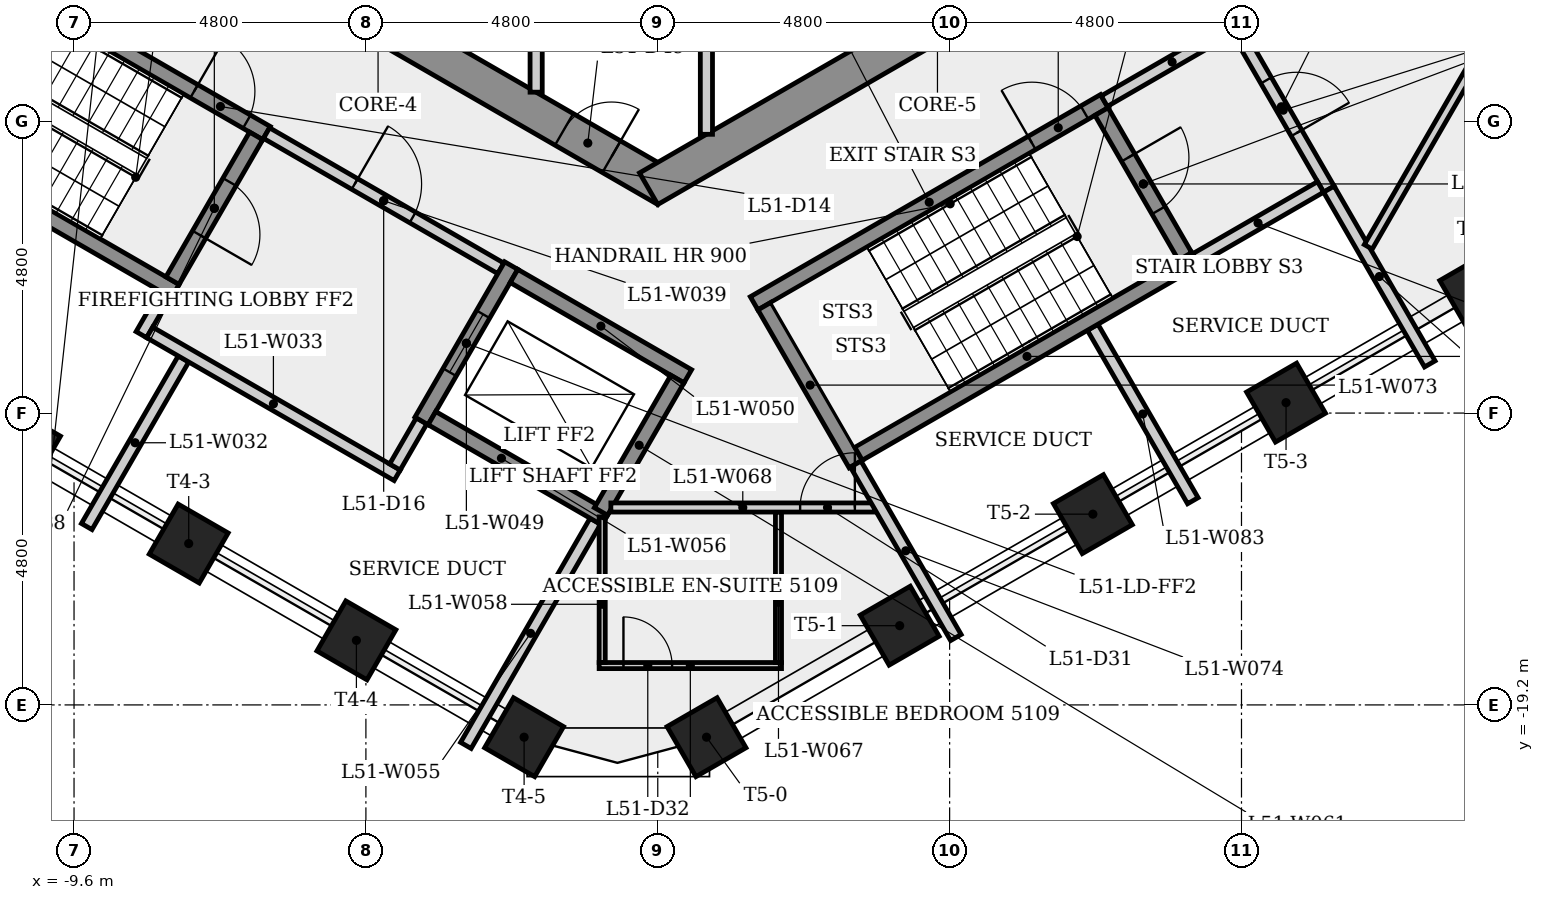
"""IFC4 building model, lengths in metres.
Left out: names, types, materials, properties, quantities, classifications, styles, units other than length and angle.
Written with IfcOpenShell. Run it as: python <this file> out.ifc"""

import sys

from ifc_helpers import new_model, si_unit, direction, frame, frame_2d, origin, origin_2d, place, context, subcontext, project, spatial, rectangle, extrude, element, fill, save


model = new_model("IFC4")
c1 = context("Model", 3, precision=1e-05, world=origin(), true_north=direction((0.0, 1.0)))
c2 = subcontext(c1, "Body", "Model", "MODEL_VIEW")
j1 = project(units=[si_unit("LENGTHUNIT", "METRE"), si_unit("PLANEANGLEUNIT", "RADIAN")], contexts=[c1])
p1 = place(None, origin())
s1 = spatial("IfcSite", under=j1, at=p1, CompositionType="ELEMENT")
p2 = place(p1, origin())
s2 = spatial("IfcBuilding", under=s1, at=p2, CompositionType="ELEMENT")
p3 = place(p2, frame((0.0, 0.0, 190.7)))
s3 = spatial("IfcBuildingStorey", under=s2, at=p3, CompositionType="ELEMENT", Elevation=190.7)
p4 = place(p3, frame((-9.35, -5.225, 0.0), z_axis=(0.0, 0.0, 1.0), x_axis=(0.866023993627, -0.500002442456, 0.0)))
e1 = element("IfcWall", 1, at=p4, inside=s3, PredefinedType="SHEAR", context=c2, shape_type="SweptSolid", body=[
    extrude(rectangle(XDim=10.97, YDim=0.6, at=frame_2d((5.485, 0.0))), origin(), (0.0, 0.0, 1.0), 4.0),
])
p5 = place(p4, frame((3.891, 0.0, 0.0)))
e2 = element("IfcOpeningElement", 2, at=p5, cuts=e1, PredefinedType="OPENING", context=c2, shape_type="SweptSolid", body=[
    extrude(rectangle(XDim=0.9, YDim=2.1, at=frame_2d((0.45, 1.05))), frame((0.0, 0.31, 0.0), z_axis=(0.0, -1.0, 0.0), x_axis=(1.0, 0.0, 0.0)), (0.0, 0.0, 1.0), 0.62),
])
p6 = place(p4, frame((9.018, 0.0, 0.0)))
e3 = element("IfcOpeningElement", 3, at=p6, cuts=e1, PredefinedType="OPENING", context=c2, shape_type="SweptSolid", body=[
    extrude(rectangle(XDim=0.9, YDim=2.1, at=frame_2d((0.45, 1.05))), frame((0.0, 0.31, 0.0), z_axis=(0.0, -1.0, 0.0), x_axis=(1.0, 0.0, 0.0)), (0.0, 0.0, 1.0), 0.62),
])
p7 = place(p3, frame((-0.15, -10.71, 0.0), z_axis=(0.0, 0.0, 1.0), x_axis=(0.866023993627, 0.500002442456, 0.0)))
e4 = element("IfcWall", 4, at=p7, inside=s3, PredefinedType="SHEAR", context=c2, shape_type="SweptSolid", body=[
    extrude(rectangle(XDim=10.97, YDim=0.6, at=frame_2d((5.485, 0.0))), origin(), (0.0, 0.0, 1.0), 4.0),
])
p8 = place(p7, frame((7.166, 0.0, 0.0)))
e5 = element("IfcOpeningElement", 5, at=p8, cuts=e4, PredefinedType="OPENING", context=c2, shape_type="SweptSolid", body=[
    extrude(rectangle(XDim=0.9, YDim=2.1, at=frame_2d((0.45, 1.05))), frame((0.0, 0.31, 0.0), z_axis=(0.0, -1.0, 0.0), x_axis=(1.0, 0.0, 0.0)), (0.0, 0.0, 1.0), 0.62),
])
for number, where, z_axis, x_axis in (
    (6, (-10.472, -14.954, 0.0), (0.0, 0.0, 1.0), (-0.5, -0.866, 0.0)),
    (7, (-7.714, -16.546, 0.0), (0.0, 0.0, 1.0), (-0.5, -0.866, 0.0)),
    (8, (-4.956, -18.138, 0.0), (0.0, 0.0, 1.0), (-0.5, -0.866, 0.0)),
    (9, (-2.198, -19.731, 0.0), (0.0, 0.0, 1.0), (-0.5, -0.866, 0.0)),
    (10, (0.802, -19.731, 0.0), (0.0, 0.0, 1.0), (0.5, -0.866, 0.0)),
    (11, (3.979, -17.897, 0.0), (0.0, 0.0, 1.0), (0.5, -0.866, 0.0)),
    (12, (7.156, -16.062, 0.0), (0.0, 0.0, 1.0), (0.5, -0.866, 0.0)),
    (13, (10.333, -14.228, 0.0), (0.0, 0.0, 1.0), (0.5, -0.866, 0.0)),
    (14, (13.51, -12.394, 0.0), (0.0, 0.0, 1.0), (0.5, -0.866, 0.0)),
):
    element("IfcColumn", number, at=place(p3, frame(where, z_axis=z_axis, x_axis=x_axis)), inside=s3, PredefinedType="COLUMN", context=c2, shape_type="SweptSolid", body=[
        extrude(rectangle(XDim=0.95, YDim=0.95, at=origin_2d()), origin(), (0.0, 0.0, 1.0), 4.0),
    ])
p9 = place(p3, frame((-11.977, -6.595, 0.0), z_axis=(0.0, 0.0, 1.0), x_axis=(0.866025499775, -0.499999833739, 0.0)))
e15 = element("IfcWall", 15, at=p9, inside=s3, PredefinedType="SHEAR", context=c2, shape_type="SweptSolid", body=[
    extrude(rectangle(XDim=6.4, YDim=0.25, at=frame_2d((3.2, 0.0))), origin(), (0.0, 0.0, 1.0), 3.6),
])
p10 = place(p9, frame((5.025, 0.0, 0.0)))
e16 = element("IfcOpeningElement", 16, at=p10, cuts=e15, PredefinedType="OPENING", context=c2, shape_type="SweptSolid", body=[
    extrude(rectangle(XDim=1.0, YDim=2.1, at=frame_2d((0.5, 1.05))), frame((0.0, 0.135, 0.0), z_axis=(0.0, -1.0, 0.0), x_axis=(1.0, 0.0, 0.0)), (0.0, 0.0, 1.0), 0.27),
])
p11 = place(p3, frame((-8.493, -13.11, 0.0), z_axis=(0.0, 0.0, 1.0), x_axis=(0.500067724834, 0.865986299303, 0.0)))
e17 = element("IfcWall", 17, at=p11, inside=s3, PredefinedType="PLUMBINGWALL", context=c2, shape_type="SweptSolid", body=[
    extrude(rectangle(XDim=0.775, YDim=0.2, at=frame_2d((0.388, 0.0))), origin(), (0.0, 0.0, 1.0), 3.6),
])
p12 = place(p3, frame((-7.935, -12.393, 0.0), z_axis=(0.0, 0.0, 1.0), x_axis=(-0.866025499775, 0.499999833739, 0.0)))
e18 = element("IfcWall", 18, at=p12, inside=s3, PredefinedType="SHEAR", context=c2, shape_type="SweptSolid", body=[
    extrude(rectangle(XDim=6.4, YDim=0.25, at=frame_2d((3.2, 0.0))), origin(), (0.0, 0.0, 1.0), 3.6),
])
p13 = place(p3, frame((-7.8, -13.51, 0.0), z_axis=(0.0, 0.0, 1.0), x_axis=(-0.500016846771, -0.866015677078, 0.0)))
e19 = element("IfcWall", 19, at=p13, inside=s3, PredefinedType="PLUMBINGWALL", context=c2, shape_type="SweptSolid", body=[
    extrude(rectangle(XDim=3.183, YDim=0.2, at=frame_2d((1.591, 0.0))), origin(), (0.0, 0.0, 1.0), 3.6),
])
p14 = place(p3, frame((-8.356, -13.073, 0.0), z_axis=(0.0, 0.0, 1.0), x_axis=(0.866038532462, -0.499977259774, 0.0)))
e20 = element("IfcWall", 20, at=p14, inside=s3, PredefinedType="PLUMBINGWALL", context=c2, shape_type="SweptSolid", body=[
    extrude(rectangle(XDim=4.7, YDim=0.2, at=frame_2d((2.35, 0.0))), origin(), (0.0, 0.0, 1.0), 3.6),
])
p15 = place(p3, frame((-6.605, -9.841, 0.0), z_axis=(0.0, 0.0, 1.0), x_axis=(-0.499996545922, -0.866027397988, 0.0)))
e21 = element("IfcWall", 21, at=p15, inside=s3, PredefinedType="SHEAR", context=c2, shape_type="SweptSolid", body=[
    extrude(rectangle(XDim=2.75, YDim=0.25, at=frame_2d((1.375, 0.0))), origin(), (0.0, 0.0, 1.0), 3.6),
])
p16 = place(p15, frame((0.875, 0.0, 0.0)))
e22 = element("IfcOpeningElement", 22, at=p16, cuts=e21, PredefinedType="OPENING", context=c2, shape_type="SweptSolid", body=[
    extrude(rectangle(XDim=1.0, YDim=2.1, at=frame_2d((0.5, 1.05))), frame((0.0, 0.135, 0.0), z_axis=(0.0, -1.0, 0.0), x_axis=(1.0, 0.0, 0.0)), (0.0, 0.0, 1.0), 0.27),
])
p17 = place(p3, frame((-6.435, -9.795, 0.0), z_axis=(0.0, 0.0, 1.0), x_axis=(0.866012907634, -0.500021643343, 0.0)))
e23 = element("IfcWall", 23, at=p17, inside=s3, PredefinedType="PARTITIONING", context=c2, shape_type="SweptSolid", body=[
    extrude(rectangle(XDim=4.45, YDim=0.2, at=frame_2d((2.225, 0.0))), origin(), (0.0, 0.0, 1.0), 3.6),
])
p18 = place(p17, frame((1.675, 0.0, 0.0)))
e24 = element("IfcOpeningElement", 24, at=p18, cuts=e23, PredefinedType="OPENING", context=c2, shape_type="SweptSolid", body=[
    extrude(rectangle(XDim=1.1, YDim=2.1, at=frame_2d((0.55, 1.05))), frame((0.0, 0.11, 0.0), z_axis=(0.0, -1.0, 0.0), x_axis=(1.0, 0.0, 0.0)), (0.0, 0.0, 1.0), 0.22),
])
p19 = place(p3, frame((-3.885, -14.529, 0.0), z_axis=(0.0, 0.0, 1.0), x_axis=(-0.499859285417, -0.866106630146, 0.0)))
e25 = element("IfcWall", 25, at=p19, inside=s3, PredefinedType="PLUMBINGWALL", context=c2, shape_type="SweptSolid", body=[
    extrude(rectangle(XDim=0.875, YDim=0.2, at=frame_2d((0.438, 0.0))), origin(), (0.0, 0.0, 1.0), 3.6),
])
p20 = place(p3, frame((-2.41, -11.974, 0.0), z_axis=(0.0, 0.0, 1.0), x_axis=(-0.500001826776, -0.866024349092, 0.0)))
e26 = element("IfcWall", 26, at=p20, inside=s3, PredefinedType="SHEAR", context=c2, shape_type="SweptSolid", body=[
    extrude(rectangle(XDim=2.95, YDim=0.25, at=frame_2d((1.475, 0.0))), origin(), (0.0, 0.0, 1.0), 3.6),
])
p21 = place(p20, frame((0.925, 0.0, 0.0)))
e27 = element("IfcOpeningElement", 27, at=p21, cuts=e26, PredefinedType="OPENING", context=c2, shape_type="SweptSolid", body=[
    extrude(rectangle(XDim=1.1, YDim=2.1, at=frame_2d((0.55, 1.05))), frame((0.0, 0.135, 0.0), z_axis=(0.0, -1.0, 0.0), x_axis=(1.0, 0.0, 0.0)), (0.0, 0.0, 1.0), 0.27),
])
p22 = place(p3, frame((-2.364, -12.145, 0.0), z_axis=(0.0, 0.0, 1.0), x_axis=(0.866040211805, -0.499974350878, 0.0)))
e28 = element("IfcWall", 28, at=p22, inside=s3, PredefinedType="SHEAR", context=c2, shape_type="SweptSolid", body=[
    extrude(rectangle(XDim=3.3, YDim=0.25, at=frame_2d((1.65, 0.0))), origin(), (0.0, 0.0, 1.0), 3.6),
])
p23 = place(p3, frame((-2.0, -5.25, 0.0), z_axis=(0.0, 0.0, 1.0), x_axis=(0.0, -1.0, 0.0)))
e29 = element("IfcWall", 29, at=p23, inside=s3, PredefinedType="PARTITIONING", context=c2, shape_type="SweptSolid", body=[
    extrude(rectangle(XDim=3.872, YDim=0.2, at=frame_2d((1.936, 0.0))), origin(), (0.0, 0.0, 1.0), 3.6),
])
p24 = place(p3, frame((-1.027, -16.179, 0.0), z_axis=(0.0, 0.0, 1.0), x_axis=(-0.500011993549, -0.866018479195, 0.0)))
e30 = element("IfcWall", 30, at=p24, inside=s3, PredefinedType="PLUMBINGWALL", context=c2, shape_type="SweptSolid", body=[
    extrude(rectangle(XDim=4.258, YDim=0.2, at=frame_2d((2.129, 0.0))), origin(), (0.0, 0.0, 1.0), 3.6),
])
p25 = place(p3, frame((-0.856, -16.133, 0.0), z_axis=(0.0, 0.0, 1.0), x_axis=(-0.866021716278, 0.500006386895, 0.0)))
e31 = element("IfcWall", 31, at=p25, inside=s3, PredefinedType="SHEAR", context=c2, shape_type="SweptSolid", body=[
    extrude(rectangle(XDim=3.3, YDim=0.25, at=frame_2d((1.65, 0.0))), origin(), (0.0, 0.0, 1.0), 3.6),
])
p26 = place(p3, frame((-0.964, -18.553, 0.0), z_axis=(0.0, 0.0, 1.0), x_axis=(1.0, 0.0, 0.0)))
e32 = element("IfcWall", 32, at=p26, inside=s3, PredefinedType="PARTITIONING", context=c2, shape_type="SweptSolid", body=[
    extrude(rectangle(XDim=2.999, YDim=0.1, at=frame_2d((1.5, 0.0))), origin(), (0.0, 0.0, 1.0), 3.6),
])
p27 = place(p26, frame((0.4, 0.0, 0.0)))
e33 = element("IfcOpeningElement", 33, at=p27, cuts=e32, PredefinedType="OPENING", context=c2, shape_type="SweptSolid", body=[
    extrude(rectangle(XDim=0.8, YDim=2.1, at=frame_2d((0.4, 1.05))), frame((0.0, 0.06, 0.0), z_axis=(0.0, -1.0, 0.0), x_axis=(1.0, 0.0, 0.0)), (0.0, 0.0, 1.0), 0.12),
])
p28 = place(p3, frame((-0.914, -16.108, 0.0), z_axis=(0.0, 0.0, 1.0), x_axis=(0.0, -1.0, 0.0)))
e34 = element("IfcWall", 34, at=p28, inside=s3, PredefinedType="PARTITIONING", context=c2, shape_type="SweptSolid", body=[
    extrude(rectangle(XDim=2.395, YDim=0.1, at=frame_2d((1.198, 0.0))), origin(), (0.0, 0.0, 1.0), 3.6),
])
p29 = place(p3, frame((0.323, -13.841, 0.0), z_axis=(0.0, 0.0, 1.0), x_axis=(-0.500013859761, -0.8660174017, 0.0)))
e35 = element("IfcWall", 35, at=p29, inside=s3, PredefinedType="SHEAR", context=c2, shape_type="SweptSolid", body=[
    extrude(rectangle(XDim=2.514, YDim=0.25, at=frame_2d((1.257, 0.0))), origin(), (0.0, 0.0, 1.0), 4.0),
])
p30 = place(p3, frame((0.8, -5.25, 0.0), z_axis=(0.0, 0.0, 1.0), x_axis=(0.0, -1.0, 0.0)))
e36 = element("IfcWall", 36, at=p30, inside=s3, PredefinedType="PARTITIONING", context=c2, shape_type="SweptSolid", body=[
    extrude(rectangle(XDim=4.565, YDim=0.2, at=frame_2d((2.282, 0.0))), origin(), (0.0, 0.0, 1.0), 3.6),
])
p31 = place(p3, frame((1.585, -12.595, 0.0), z_axis=(0.0, 0.0, 1.0), x_axis=(0.866036417653, 0.499980922934, 0.0)))
e37 = element("IfcWall", 37, at=p31, inside=s3, PredefinedType="SHEAR", context=c2, shape_type="SweptSolid", body=[
    extrude(rectangle(XDim=6.65, YDim=0.25, at=frame_2d((3.325, 0.0))), origin(), (0.0, 0.0, 1.0), 3.6),
])
p32 = place(p31, frame((5.275, 0.0, 0.0)))
e38 = element("IfcOpeningElement", 38, at=p32, cuts=e37, PredefinedType="OPENING", context=c2, shape_type="SweptSolid", body=[
    extrude(rectangle(XDim=1.0, YDim=2.1, at=frame_2d((0.5, 1.05))), frame((0.0, 0.135, 0.0), z_axis=(0.0, -1.0, 0.0), x_axis=(1.0, 0.0, 0.0)), (0.0, 0.0, 1.0), 0.27),
])
p33 = place(p3, frame((1.985, -18.503, 0.0), z_axis=(0.0, 0.0, 1.0), x_axis=(0.0, 1.0, 0.0)))
e39 = element("IfcWall", 39, at=p33, inside=s3, PredefinedType="PARTITIONING", context=c2, shape_type="SweptSolid", body=[
    extrude(rectangle(XDim=2.475, YDim=0.1, at=frame_2d((1.238, 0.0))), origin(), (0.0, 0.0, 1.0), 3.6),
])
p34 = place(p3, frame((-0.771, -15.953, 0.0), z_axis=(0.0, 0.0, 1.0), x_axis=(1.0, 0.0, 0.0)))
e40 = element("IfcWall", 40, at=p34, inside=s3, PredefinedType="PARTITIONING", context=c2, shape_type="SweptSolid", body=[
    extrude(rectangle(XDim=4.339, YDim=0.15, at=frame_2d((2.17, 0.0))), origin(), (0.0, 0.0, 1.0), 3.6),
])
p35 = place(p34, frame((3.113, 0.0, 0.0)))
e41 = element("IfcOpeningElement", 41, at=p35, cuts=e40, PredefinedType="OPENING", context=c2, shape_type="SweptSolid", body=[
    extrude(rectangle(XDim=0.9, YDim=2.1, at=frame_2d((0.45, 1.05))), frame((0.0, 0.085, 0.0), z_axis=(0.0, -1.0, 0.0), x_axis=(1.0, 0.0, 0.0)), (0.0, 0.0, 1.0), 0.17),
])
p36 = place(p3, frame((3.256, -15.239, 0.0), z_axis=(0.0, 0.0, 1.0), x_axis=(-0.50002537861, 0.866010750942, 0.0)))
e42 = element("IfcWall", 42, at=p36, inside=s3, PredefinedType="SHEAR", context=c2, shape_type="SweptSolid", body=[
    extrude(rectangle(XDim=3.0, YDim=0.25, at=frame_2d((1.5, 0.0))), origin(), (0.0, 0.0, 1.0), 3.6),
])
p37 = place(p3, frame((3.256, -15.239, 0.0), z_axis=(0.0, 0.0, 1.0), x_axis=(0.499949127178, -0.86605477323, 0.0)))
e43 = element("IfcWall", 43, at=p37, inside=s3, PredefinedType="PLUMBINGWALL", context=c2, shape_type="SweptSolid", body=[
    extrude(rectangle(XDim=3.294, YDim=0.2, at=frame_2d((1.647, 0.0))), origin(), (0.0, 0.0, 1.0), 3.6),
])
p38 = place(p3, frame((7.153, -12.989, 0.0), z_axis=(0.0, 0.0, 1.0), x_axis=(0.5000047107, -0.866022684043, 0.0)))
e44 = element("IfcWall", 44, at=p38, inside=s3, PredefinedType="PLUMBINGWALL", context=c2, shape_type="SweptSolid", body=[
    extrude(rectangle(XDim=3.294, YDim=0.2, at=frame_2d((1.647, 0.0))), origin(), (0.0, 0.0, 1.0), 3.6),
])
p39 = place(p3, frame((3.301, -15.068, 0.0), z_axis=(0.0, 0.0, 1.0), x_axis=(0.866035036182, 0.499983315828, 0.0)))
e45 = element("IfcWall", 45, at=p39, inside=s3, PredefinedType="SHEAR", context=c2, shape_type="SweptSolid", body=[
    extrude(rectangle(XDim=6.4, YDim=0.25, at=frame_2d((3.2, 0.0))), origin(), (0.0, 0.0, 1.0), 4.0),
])
p40 = place(p3, frame((7.298, -9.441, 0.0), z_axis=(0.0, 0.0, 1.0), x_axis=(0.500034990121, -0.866005201286, 0.0)))
e46 = element("IfcWall", 46, at=p40, inside=s3, PredefinedType="SHEAR", context=c2, shape_type="SweptSolid", body=[
    extrude(rectangle(XDim=2.75, YDim=0.25, at=frame_2d((1.375, 0.0))), origin(), (0.0, 0.0, 1.0), 3.6),
])
p41 = place(p40, frame((0.875, 0.0, 0.0)))
e47 = element("IfcOpeningElement", 47, at=p41, cuts=e46, PredefinedType="OPENING", context=c2, shape_type="SweptSolid", body=[
    extrude(rectangle(XDim=1.0, YDim=2.1, at=frame_2d((0.5, 1.05))), frame((0.0, 0.135, 0.0), z_axis=(0.0, -1.0, 0.0), x_axis=(1.0, 0.0, 0.0)), (0.0, 0.0, 1.0), 0.27),
])
p42 = place(p3, frame((7.344, -9.27, 0.0), z_axis=(0.0, 0.0, 1.0), x_axis=(0.866005588531, 0.500034319456, 0.0)))
e48 = element("IfcWall", 48, at=p42, inside=s3, PredefinedType="PARTITIONING", context=c2, shape_type="SweptSolid", body=[
    extrude(rectangle(XDim=2.575, YDim=0.2, at=frame_2d((1.288, 0.0))), origin(), (0.0, 0.0, 1.0), 3.6),
])
p43 = place(p3, frame((9.537, -8.119, 0.0), z_axis=(0.0, 0.0, 1.0), x_axis=(0.499990139034, -0.866031096941, 0.0)))
e49 = element("IfcWall", 49, at=p43, inside=s3, PredefinedType="PARTITIONING", context=c2, shape_type="SweptSolid", body=[
    extrude(rectangle(XDim=3.0, YDim=0.2, at=frame_2d((1.5, 0.0))), origin(), (0.0, 0.0, 1.0), 3.6),
])
p44 = place(p43, frame((0.935, 0.0, 0.0)))
e50 = element("IfcOpeningElement", 50, at=p44, cuts=e49, PredefinedType="OPENING", context=c2, shape_type="SweptSolid", body=[
    extrude(rectangle(XDim=1.0, YDim=2.1, at=frame_2d((0.5, 1.05))), frame((0.0, 0.11, 0.0), z_axis=(0.0, -1.0, 0.0), x_axis=(1.0, 0.0, 0.0)), (0.0, 0.0, 1.0), 0.22),
])
p45 = place(p3, frame((10.901, -10.681, 0.0), z_axis=(0.0, 0.0, 1.0), x_axis=(-0.866007538022, -0.500030943131, 0.0)))
e51 = element("IfcWall", 51, at=p45, inside=s3, PredefinedType="PLUMBINGWALL", context=c2, shape_type="SweptSolid", body=[
    extrude(rectangle(XDim=2.375, YDim=0.2, at=frame_2d((1.188, 0.0))), origin(), (0.0, 0.0, 1.0), 3.6),
])
p46 = place(p3, frame((11.037, -10.717, 0.0), z_axis=(0.0, 0.0, 1.0), x_axis=(0.500015331954, -0.866016551696, 0.0)))
e52 = element("IfcWall", 52, at=p46, inside=s3, PredefinedType="PLUMBINGWALL", context=c2, shape_type="SweptSolid", body=[
    extrude(rectangle(XDim=3.319, YDim=0.2, at=frame_2d((1.66, 0.0))), origin(), (0.0, 0.0, 1.0), 3.6),
])
p47 = place(p3, frame((15.611, -4.866, 0.0), z_axis=(0.0, 0.0, 1.0), x_axis=(-0.500001468015, -0.866024556224, 0.0)))
e53 = element("IfcWall", 53, at=p47, inside=s3, PredefinedType="PARTITIONING", context=c2, shape_type="SweptSolid", body=[
    extrude(rectangle(XDim=7.852, YDim=0.15, at=frame_2d((3.926, 0.0))), origin(), (0.0, 0.0, 1.0), 3.6),
])
p48 = place(p47, frame((3.426, 0.0, 0.0)))
e54 = element("IfcOpeningElement", 54, at=p48, cuts=e53, PredefinedType="OPENING", context=c2, shape_type="SweptSolid", body=[
    extrude(rectangle(XDim=1.0, YDim=2.1, at=frame_2d((0.5, 1.05))), frame((0.0, 0.085, 0.0), z_axis=(0.0, -1.0, 0.0), x_axis=(1.0, 0.0, 0.0)), (0.0, 0.0, 1.0), 0.17),
])
p49 = place(p10, origin())
e55 = element("IfcDoor", 55, at=p49, inside=s3, OperationType="SINGLE_SWING_LEFT", PredefinedType="DOOR", context=c2, shape_type="SweptSolid", body=[
    extrude(rectangle(XDim=1.0, YDim=2.1, at=frame_2d((0.5, 1.05))), frame((0.0, 0.025, 0.0), z_axis=(0.0, -1.0, 0.0), x_axis=(1.0, 0.0, 0.0)), (0.0, 0.0, 1.0), 0.05),
])
fill(e16, e55)
p50 = place(p16, origin())
e56 = element("IfcDoor", 56, at=p50, inside=s3, OperationType="SINGLE_SWING_RIGHT", PredefinedType="DOOR", context=c2, shape_type="SweptSolid", body=[
    extrude(rectangle(XDim=1.0, YDim=2.1, at=frame_2d((0.5, 1.05))), frame((0.0, 0.025, 0.0), z_axis=(0.0, -1.0, 0.0), x_axis=(1.0, 0.0, 0.0)), (0.0, 0.0, 1.0), 0.05),
])
fill(e22, e56)
p51 = place(p18, origin())
e57 = element("IfcDoor", 57, at=p51, inside=s3, OperationType="SINGLE_SWING_LEFT", PredefinedType="DOOR", context=c2, shape_type="SweptSolid", body=[
    extrude(rectangle(XDim=1.1, YDim=2.1, at=frame_2d((0.55, 1.05))), frame((0.0, 0.025, 0.0), z_axis=(0.0, -1.0, 0.0), x_axis=(1.0, 0.0, 0.0)), (0.0, 0.0, 1.0), 0.05),
])
fill(e24, e57)
p52 = place(p21, origin())
e58 = element("IfcDoor", 58, at=p52, inside=s3, OperationType="SLIDING_TO_LEFT", PredefinedType="DOOR", context=c2, shape_type="SweptSolid", body=[
    extrude(rectangle(XDim=1.1, YDim=2.1, at=frame_2d((0.55, 1.05))), frame((0.0, 0.025, 0.0), z_axis=(0.0, -1.0, 0.0), x_axis=(1.0, 0.0, 0.0)), (0.0, 0.0, 1.0), 0.05),
])
fill(e27, e58)
p53 = place(p32, origin())
e59 = element("IfcDoor", 59, at=p53, inside=s3, OperationType="SINGLE_SWING_LEFT", PredefinedType="DOOR", context=c2, shape_type="SweptSolid", body=[
    extrude(rectangle(XDim=1.0, YDim=2.1, at=frame_2d((0.5, 1.05))), frame((0.0, 0.025, 0.0), z_axis=(0.0, -1.0, 0.0), x_axis=(1.0, 0.0, 0.0)), (0.0, 0.0, 1.0), 0.05),
])
fill(e38, e59)
p54 = place(p44, origin())
e60 = element("IfcDoor", 60, at=p54, inside=s3, OperationType="SINGLE_SWING_RIGHT", PredefinedType="DOOR", context=c2, shape_type="SweptSolid", body=[
    extrude(rectangle(XDim=1.0, YDim=2.1, at=frame_2d((0.5, 1.05))), frame((0.0, 0.025, 0.0), z_axis=(0.0, -1.0, 0.0), x_axis=(1.0, 0.0, 0.0)), (0.0, 0.0, 1.0), 0.05),
])
fill(e50, e60)
p55 = place(p41, origin())
e61 = element("IfcDoor", 61, at=p55, inside=s3, OperationType="SINGLE_SWING_LEFT", PredefinedType="DOOR", context=c2, shape_type="SweptSolid", body=[
    extrude(rectangle(XDim=1.0, YDim=2.1, at=frame_2d((0.5, 1.05))), frame((0.0, 0.025, 0.0), z_axis=(0.0, -1.0, 0.0), x_axis=(1.0, 0.0, 0.0)), (0.0, 0.0, 1.0), 0.05),
])
fill(e47, e61)
p56 = place(p35, origin())
e62 = element("IfcDoor", 62, at=p56, inside=s3, OperationType="SINGLE_SWING_RIGHT", PredefinedType="DOOR", context=c2, shape_type="SweptSolid", body=[
    extrude(rectangle(XDim=0.9, YDim=2.1, at=frame_2d((0.45, 1.05))), frame((0.0, 0.025, 0.0), z_axis=(0.0, -1.0, 0.0), x_axis=(1.0, 0.0, 0.0)), (0.0, 0.0, 1.0), 0.05),
])
fill(e41, e62)
p57 = place(p27, origin())
e63 = element("IfcDoor", 63, at=p57, inside=s3, OperationType="SINGLE_SWING_LEFT", PredefinedType="DOOR", context=c2, shape_type="SweptSolid", body=[
    extrude(rectangle(XDim=0.8, YDim=2.1, at=frame_2d((0.4, 1.05))), frame((0.0, 0.025, 0.0), z_axis=(0.0, -1.0, 0.0), x_axis=(1.0, 0.0, 0.0)), (0.0, 0.0, 1.0), 0.05),
])
fill(e33, e63)
p58 = place(p6, origin())
e64 = element("IfcDoor", 64, at=p58, inside=s3, OperationType="SINGLE_SWING_RIGHT", PredefinedType="DOOR", context=c2, shape_type="SweptSolid", body=[
    extrude(rectangle(XDim=0.9, YDim=2.1, at=frame_2d((0.45, 1.05))), frame((0.0, 0.025, 0.0), z_axis=(0.0, -1.0, 0.0), x_axis=(1.0, 0.0, 0.0)), (0.0, 0.0, 1.0), 0.05),
])
fill(e3, e64)
save(model, sys.argv[1])
